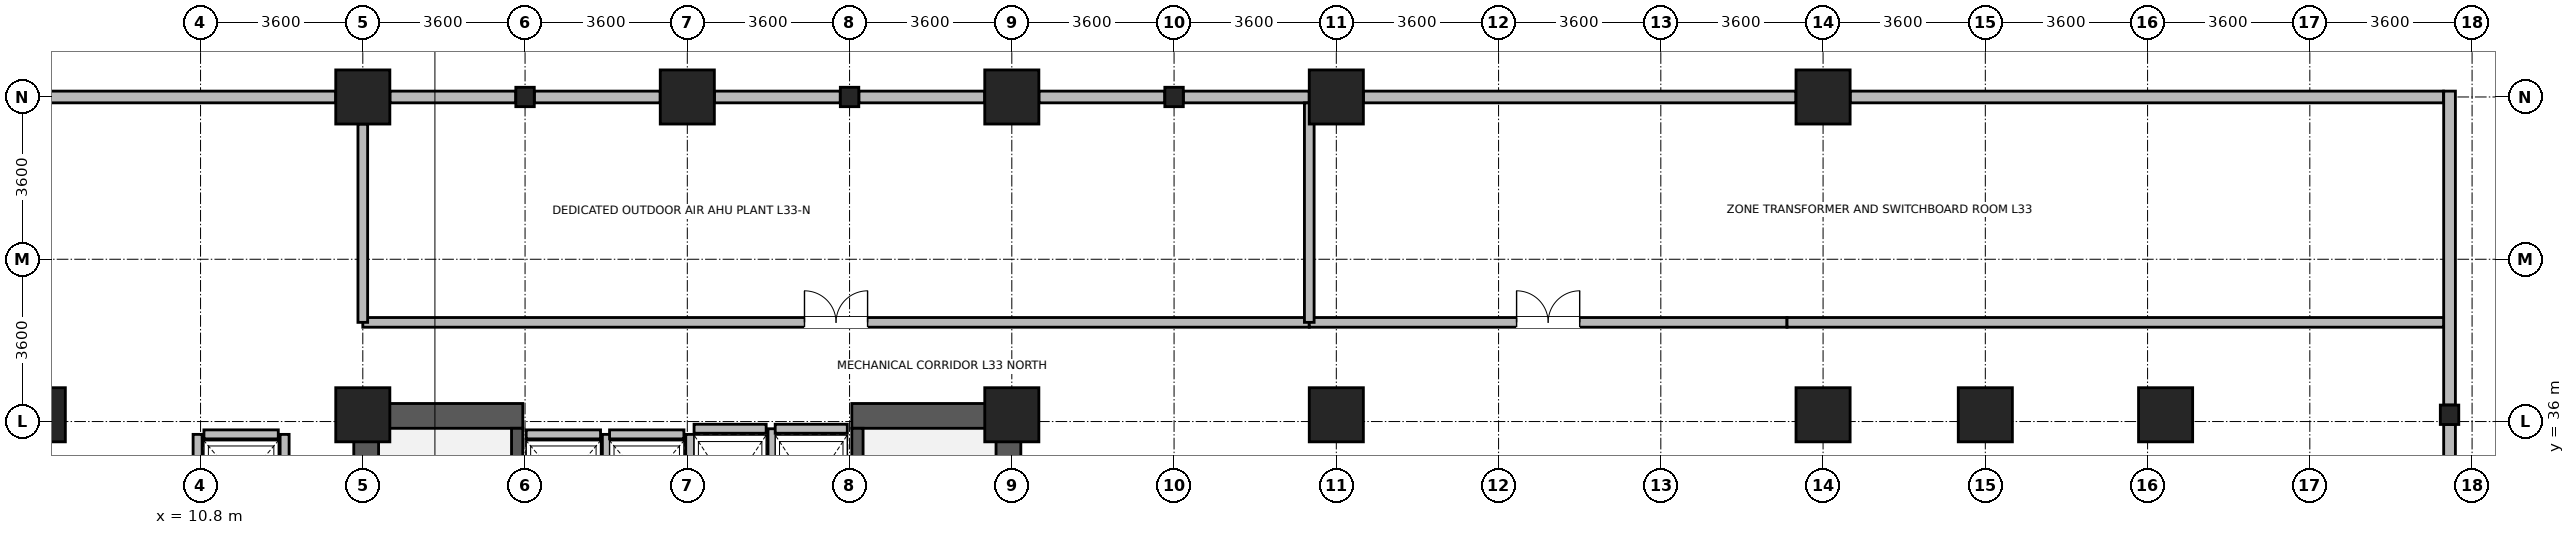
"""IFC4 building model, lengths in metres.
Left out: names, types, materials, properties, quantities, classifications, styles, units other than length and angle.
Written with IfcOpenShell. Run it as: python <this file> out.ifc"""

import sys

from ifc_helpers import new_model, si_unit, direction, frame, frame_2d, origin, origin_2d, place, context, subcontext, project, spatial, rectangle, i_section, extrude, source, transform, mapped, element, fill, save


model = new_model("IFC4")
c1 = context("Model", 3, precision=1e-05, world=origin(), true_north=direction((0.0, 1.0)))
c2 = subcontext(c1, "Body", "Model", "MODEL_VIEW")
j1 = project(units=[si_unit("LENGTHUNIT", "METRE"), si_unit("PLANEANGLEUNIT", "RADIAN")], contexts=[c1])
p1 = place(None, origin())
s1 = spatial("IfcSite", under=j1, at=p1, CompositionType="ELEMENT")
p2 = place(p1, origin())
s2 = spatial("IfcBuilding", under=s1, at=p2, CompositionType="ELEMENT")
p3 = place(p2, frame((0.0, 0.0, 130.4)))
s3 = spatial("IfcBuildingStorey", under=s2, at=p3, CompositionType="ELEMENT", Elevation=130.4)
for number, where, z_axis, x_axis in (
    (1, (14.475, 28.3, 0.0), (0.0, 0.0, 1.0), (0.0, 1.0, 0.0)),
    (2, (28.725, 28.3, 0.0), (0.0, 0.0, 1.0), (0.0, 1.0, 0.0)),
):
    element("IfcWall", number, at=place(p3, frame(where, z_axis=z_axis, x_axis=x_axis)), inside=s3, PredefinedType="SHEAR", context=c2, shape_type="SweptSolid", body=[
        extrude(rectangle(XDim=8.1, YDim=0.55, at=frame_2d((4.05, 0.0))), origin(), (0.0, 0.0, 1.0), 4.78),
    ])
for number, where, z_axis, x_axis in (
    (3, (14.75, 36.125, 0.0), (0.0, 0.0, 1.0), (1.0, 0.0, 0.0)),
    (4, (25.25, 36.125, 0.0), (0.0, 0.0, 1.0), (1.0, 0.0, 0.0)),
):
    element("IfcWall", number, at=place(p3, frame(where, z_axis=z_axis, x_axis=x_axis)), inside=s3, PredefinedType="SHEAR", context=c2, shape_type="SweptSolid", body=[
        extrude(rectangle(XDim=3.2, YDim=0.55, at=frame_2d((1.6, 0.0))), origin(), (0.0, 0.0, 1.0), 4.78),
    ])
p4 = place(p3, frame((17.825, 28.85, 0.0), z_axis=(0.0, 0.0, 1.0), x_axis=(0.0, 1.0, 0.0)))
e5 = element("IfcWall", 5, at=p4, inside=s3, PredefinedType="SHEAR", context=c2, shape_type="SweptSolid", body=[
    extrude(rectangle(XDim=7.0, YDim=0.25, at=frame_2d((3.5, 0.0))), origin(), (0.0, 0.0, 1.0), 4.78),
])
p5 = place(p4, frame((0.15, 0.0, 0.0)))
e6 = element("IfcOpeningElement", 6, at=p5, cuts=e5, PredefinedType="OPENING", context=c2, shape_type="SweptSolid", body=[
    extrude(rectangle(XDim=1.1, YDim=2.08, at=frame_2d((0.55, 1.04))), frame((0.0, 0.135, 0.0), z_axis=(0.0, -1.0, 0.0), x_axis=(1.0, 0.0, 0.0)), (0.0, 0.0, 1.0), 0.27),
])
p6 = place(p3, frame((25.375, 28.85, 0.0), z_axis=(0.0, 0.0, 1.0), x_axis=(0.0, 1.0, 0.0)))
e7 = element("IfcWall", 7, at=p6, inside=s3, PredefinedType="SHEAR", context=c2, shape_type="SweptSolid", body=[
    extrude(rectangle(XDim=7.0, YDim=0.25, at=frame_2d((3.5, 0.0))), origin(), (0.0, 0.0, 1.0), 4.78),
])
p7 = place(p6, frame((0.15, 0.0, 0.0)))
e8 = element("IfcOpeningElement", 8, at=p7, cuts=e7, PredefinedType="OPENING", context=c2, shape_type="SweptSolid", body=[
    extrude(rectangle(XDim=1.1, YDim=2.08, at=frame_2d((0.55, 1.04))), frame((0.0, 0.135, 0.0), z_axis=(0.0, -1.0, 0.0), x_axis=(1.0, 0.0, 0.0)), (0.0, 0.0, 1.0), 0.27),
])
m1 = source(origin(), c2, "Body", "SweptSolid", [
    extrude(rectangle(XDim=1.2, YDim=1.2, at=origin_2d()), origin(), (0.0, 0.0, 1.0), 5.2),
])
for number, where, z_axis, x_axis in (
    (9, (7.2, 36.15, 0.0), (0.0, 0.0, 1.0), (1.0, 0.0, 0.0)),
    (10, (14.4, 36.15, 0.0), (0.0, 0.0, 1.0), (1.0, 0.0, 0.0)),
    (11, (14.4, 43.2, 0.0), (0.0, 0.0, 1.0), (1.0, 0.0, 0.0)),
    (12, (21.6, 43.2, 0.0), (0.0, 0.0, 1.0), (1.0, 0.0, 0.0)),
    (13, (28.8, 36.15, 0.0), (0.0, 0.0, 1.0), (1.0, 0.0, 0.0)),
    (14, (28.8, 43.2, 0.0), (0.0, 0.0, 1.0), (1.0, 0.0, 0.0)),
    (15, (36.0, 43.2, 0.0), (0.0, 0.0, 1.0), (1.0, 0.0, 0.0)),
    (16, (36.0, 36.15, 0.0), (0.0, 0.0, 1.0), (1.0, 0.0, 0.0)),
    (17, (46.8, 36.15, 0.0), (0.0, 0.0, 1.0), (1.0, 0.0, 0.0)),
    (18, (46.8, 43.2, 0.0), (0.0, 0.0, 1.0), (1.0, 0.0, 0.0)),
    (19, (50.4, 36.15, 0.0), (0.0, 0.0, 1.0), (1.0, 0.0, 0.0)),
    (20, (54.4, 36.15, 0.0), (0.0, 0.0, 1.0), (1.0, 0.0, 0.0)),
):
    element("IfcColumn", number, at=place(p3, frame(where, z_axis=z_axis, x_axis=x_axis)), inside=s3, PredefinedType="COLUMN", context=c2, shape_type="MappedRepresentation", body=[
        mapped(m1, transform((0.0, 0.0, 0.0), x_axis=(1.0, 0.0, 0.0), y_axis=(0.0, 1.0, 0.0), z_axis=(0.0, 0.0, 1.0), scale=1.0)),
    ])
m2 = source(origin(), c2, "Body", "SweptSolid", [
    extrude(i_section(OverallWidth=0.409, OverallDepth=0.43, WebThickness=0.024, FlangeThickness=0.033, FilletRadius=0.015, at=origin_2d()), origin(), (0.0, 0.0, 1.0), 5.2),
])
for number, where, z_axis, x_axis in (
    (21, (18.0, 43.2, 0.0), (0.0, 0.0, 1.0), (1.0, 0.0, 0.0)),
    (22, (25.2, 43.2, 0.0), (0.0, 0.0, 1.0), (1.0, 0.0, 0.0)),
    (23, (32.4, 43.2, 0.0), (0.0, 0.0, 1.0), (1.0, 0.0, 0.0)),
    (24, (60.7, 36.15, 0.0), (0.0, 0.0, 1.0), (1.0, 0.0, 0.0)),
):
    element("IfcColumn", number, at=place(p3, frame(where, z_axis=z_axis, x_axis=x_axis)), inside=s3, PredefinedType="COLUMN", context=c2, shape_type="MappedRepresentation", body=[
        mapped(m2, transform((0.0, 0.0, 0.0), x_axis=(1.0, 0.0, 0.0), y_axis=(0.0, 1.0, 0.0), z_axis=(0.0, 0.0, 1.0), scale=1.0)),
    ])
p8 = place(p3, frame((60.7, 35.934, 0.0), z_axis=(0.0, 0.0, 1.0), x_axis=(0.0, -1.0, 0.0)))
e25 = element("IfcWall", 25, at=p8, inside=s3, PredefinedType="STANDARD", context=c2, shape_type="SweptSolid", body=[
    extrude(rectangle(XDim=7.068, YDim=0.26, at=frame_2d((3.534, 0.0))), origin(), (0.0, 0.0, 1.0), 2.96),
])
p9 = place(p3, frame((60.7, 43.33, 0.0), z_axis=(0.0, 0.0, 1.0), x_axis=(0.0, -1.0, 0.0)))
e26 = element("IfcWall", 26, at=p9, inside=s3, PredefinedType="STANDARD", context=c2, shape_type="SweptSolid", body=[
    extrude(rectangle(XDim=6.964, YDim=0.26, at=frame_2d((3.482, 0.0))), origin(), (0.0, 0.0, 1.0), 4.76),
])
p10 = place(p3, frame((47.401, 43.2, 0.0), z_axis=(0.0, 0.0, 1.0), x_axis=(1.0, 0.0, 0.0)))
e27 = element("IfcWall", 27, at=p10, inside=s3, PredefinedType="STANDARD", context=c2, shape_type="SweptSolid", body=[
    extrude(rectangle(XDim=13.164, YDim=0.26, at=frame_2d((6.582, 0.0))), origin(), (0.0, 0.0, 1.0), 4.76),
])
p11 = place(p3, frame((36.601, 43.2, 0.0), z_axis=(0.0, 0.0, 1.0), x_axis=(1.0, 0.0, 0.0)))
e28 = element("IfcWall", 28, at=p11, inside=s3, PredefinedType="STANDARD", context=c2, shape_type="SweptSolid", body=[
    extrude(rectangle(XDim=9.598, YDim=0.26, at=frame_2d((4.799, 0.0))), origin(), (0.0, 0.0, 1.0), 2.96),
])
p12 = place(p3, frame((32.605, 43.2, 0.0), z_axis=(0.0, 0.0, 1.0), x_axis=(1.0, 0.0, 0.0)))
e29 = element("IfcWall", 29, at=p12, inside=s3, PredefinedType="STANDARD", context=c2, shape_type="SweptSolid", body=[
    extrude(rectangle(XDim=2.793, YDim=0.26, at=frame_2d((1.397, 0.0))), origin(), (0.0, 0.0, 1.0), 2.96),
])
p13 = place(p3, frame((29.401, 43.2, 0.0), z_axis=(0.0, 0.0, 1.0), x_axis=(1.0, 0.0, 0.0)))
e30 = element("IfcWall", 30, at=p13, inside=s3, PredefinedType="STANDARD", context=c2, shape_type="SweptSolid", body=[
    extrude(rectangle(XDim=2.794, YDim=0.26, at=frame_2d((1.397, 0.0))), origin(), (0.0, 0.0, 1.0), 2.96),
])
for number, where, z_axis, x_axis in (
    (31, (25.406, 43.2, 0.0), (0.0, 0.0, 1.0), (1.0, 0.0, 0.0)),
    (32, (22.201, 43.2, 0.0), (0.0, 0.0, 1.0), (1.0, 0.0, 0.0)),
    (33, (18.206, 43.2, 0.0), (0.0, 0.0, 1.0), (1.0, 0.0, 0.0)),
    (34, (15.001, 43.2, 0.0), (0.0, 0.0, 1.0), (1.0, 0.0, 0.0)),
):
    element("IfcWall", number, at=place(p3, frame(where, z_axis=z_axis, x_axis=x_axis)), inside=s3, PredefinedType="STANDARD", context=c2, shape_type="SweptSolid", body=[
        extrude(rectangle(XDim=2.793, YDim=0.26, at=frame_2d((1.397, 0.0))), origin(), (0.0, 0.0, 1.0), 2.96),
    ])
p14 = place(p3, frame((6.835, 43.2, 0.0), z_axis=(0.0, 0.0, 1.0), x_axis=(1.0, 0.0, 0.0)))
e35 = element("IfcWall", 35, at=p14, inside=s3, PredefinedType="STANDARD", context=c2, shape_type="SweptSolid", body=[
    extrude(rectangle(XDim=6.964, YDim=0.26, at=frame_2d((3.482, 0.0))), origin(), (0.0, 0.0, 1.0), 4.76),
])
p15 = place(p3, frame((18.025, 35.715, 0.0), z_axis=(0.0, 0.0, 1.0), x_axis=(1.0, 0.0, 0.0)))
e36 = element("IfcWall", 36, at=p15, inside=s3, PredefinedType="PARTITIONING", context=c2, shape_type="SweptSolid", body=[
    extrude(rectangle(XDim=1.65, YDim=0.2, at=frame_2d((0.825, 0.0))), origin(), (0.0, 0.0, 1.0), 4.76),
])
p16 = place(p3, frame((19.815, 33.485, 0.0), z_axis=(0.0, 0.0, 1.0), x_axis=(0.0, 1.0, 0.0)))
e37 = element("IfcWall", 37, at=p16, inside=s3, PredefinedType="PARTITIONING", context=c2, shape_type="SweptSolid", body=[
    extrude(rectangle(XDim=2.23, YDim=0.2, at=frame_2d((1.115, 0.0))), origin(), (0.0, 0.0, 1.0), 4.76),
])
p17 = place(p3, frame((19.875, 35.715, 0.0), z_axis=(0.0, 0.0, 1.0), x_axis=(1.0, 0.0, 0.0)))
e38 = element("IfcWall", 38, at=p17, inside=s3, PredefinedType="PARTITIONING", context=c2, shape_type="SweptSolid", body=[
    extrude(rectangle(XDim=1.65, YDim=0.2, at=frame_2d((0.825, 0.0))), origin(), (0.0, 0.0, 1.0), 4.76),
])
p18 = place(p3, frame((21.665, 33.485, 0.0), z_axis=(0.0, 0.0, 1.0), x_axis=(0.0, 1.0, 0.0)))
e39 = element("IfcWall", 39, at=p18, inside=s3, PredefinedType="PARTITIONING", context=c2, shape_type="SweptSolid", body=[
    extrude(rectangle(XDim=2.23, YDim=0.2, at=frame_2d((1.115, 0.0))), origin(), (0.0, 0.0, 1.0), 4.76),
])
p19 = place(p3, frame((10.875, 35.715, 0.0), z_axis=(0.0, 0.0, 1.0), x_axis=(1.0, 0.0, 0.0)))
e40 = element("IfcWall", 40, at=p19, inside=s3, PredefinedType="PARTITIONING", context=c2, shape_type="SweptSolid", body=[
    extrude(rectangle(XDim=1.65, YDim=0.2, at=frame_2d((0.825, 0.0))), origin(), (0.0, 0.0, 1.0), 4.76),
])
for number, where, z_axis, x_axis in (
    (41, (10.735, 33.485, 0.0), (0.0, 0.0, 1.0), (0.0, 1.0, 0.0)),
    (42, (12.665, 33.485, 0.0), (0.0, 0.0, 1.0), (0.0, 1.0, 0.0)),
):
    element("IfcWall", number, at=place(p3, frame(where, z_axis=z_axis, x_axis=x_axis)), inside=s3, PredefinedType="PARTITIONING", context=c2, shape_type="SweptSolid", body=[
        extrude(rectangle(XDim=2.23, YDim=0.2, at=frame_2d((1.115, 0.0))), origin(), (0.0, 0.0, 1.0), 4.76),
    ])
p20 = place(p3, frame((21.75, 35.84, 0.0), z_axis=(0.0, 0.0, 1.0), x_axis=(1.0, 0.0, 0.0)))
e43 = element("IfcWall", 43, at=p20, inside=s3, PredefinedType="PARTITIONING", context=c2, shape_type="SweptSolid", body=[
    extrude(rectangle(XDim=1.6, YDim=0.2, at=frame_2d((0.8, 0.0))), origin(), (0.0, 0.0, 1.0), 3.76),
])
p21 = place(p3, frame((23.49, 33.16, 0.0), z_axis=(0.0, 0.0, 1.0), x_axis=(0.0, 1.0, 0.0)))
e44 = element("IfcWall", 44, at=p21, inside=s3, PredefinedType="PARTITIONING", context=c2, shape_type="SweptSolid", body=[
    extrude(rectangle(XDim=2.68, YDim=0.2, at=frame_2d((1.34, 0.0))), origin(), (0.0, 0.0, 1.0), 4.76),
])
p22 = place(p3, frame((23.55, 35.84, 0.0), z_axis=(0.0, 0.0, 1.0), x_axis=(1.0, 0.0, 0.0)))
e45 = element("IfcWall", 45, at=p22, inside=s3, PredefinedType="PARTITIONING", context=c2, shape_type="SweptSolid", body=[
    extrude(rectangle(XDim=1.6, YDim=0.2, at=frame_2d((0.8, 0.0))), origin(), (0.0, 0.0, 1.0), 3.76),
])
p23 = place(p3, frame((14.4, 38.2, 0.0), z_axis=(0.0, 0.0, 1.0), x_axis=(1.0, 0.0, 0.0)))
e46 = element("IfcWall", 46, at=p23, inside=s3, PredefinedType="PARTITIONING", context=c2, shape_type="SweptSolid", body=[
    extrude(rectangle(XDim=21.0, YDim=0.215, at=frame_2d((10.5, 0.0))), origin(), (0.0, 0.0, 1.0), 4.76),
])
p24 = place(p23, frame((9.8, 0.0, 0.0)))
e47 = element("IfcOpeningElement", 47, at=p24, cuts=e46, PredefinedType="OPENING", context=c2, shape_type="SweptSolid", body=[
    extrude(rectangle(XDim=1.4, YDim=2.15, at=frame_2d((0.7, 1.075))), frame((0.0, 0.118, 0.0), z_axis=(0.0, -1.0, 0.0), x_axis=(1.0, 0.0, 0.0)), (0.0, 0.0, 1.0), 0.235),
])
p25 = place(p3, frame((35.4, 38.2, 0.0), z_axis=(0.0, 0.0, 1.0), x_axis=(1.0, 0.0, 0.0)))
e48 = element("IfcWall", 48, at=p25, inside=s3, PredefinedType="PARTITIONING", context=c2, shape_type="SweptSolid", body=[
    extrude(rectangle(XDim=10.6, YDim=0.215, at=frame_2d((5.3, 0.0))), origin(), (0.0, 0.0, 1.0), 4.76),
])
p26 = place(p25, frame((4.6, 0.0, 0.0)))
e49 = element("IfcOpeningElement", 49, at=p26, cuts=e48, PredefinedType="OPENING", context=c2, shape_type="SweptSolid", body=[
    extrude(rectangle(XDim=1.4, YDim=2.15, at=frame_2d((0.7, 1.075))), frame((0.0, 0.118, 0.0), z_axis=(0.0, -1.0, 0.0), x_axis=(1.0, 0.0, 0.0)), (0.0, 0.0, 1.0), 0.235),
])
p27 = place(p3, frame((46.0, 38.2, 0.0), z_axis=(0.0, 0.0, 1.0), x_axis=(1.0, 0.0, 0.0)))
e50 = element("IfcWall", 50, at=p27, inside=s3, PredefinedType="PARTITIONING", context=c2, shape_type="SweptSolid", body=[
    extrude(rectangle(XDim=14.568, YDim=0.215, at=frame_2d((7.284, 0.0))), origin(), (0.0, 0.0, 1.0), 4.76),
])
p28 = place(p3, frame((14.4, 38.2, 0.0), z_axis=(0.0, 0.0, 1.0), x_axis=(0.0, 1.0, 0.0)))
e51 = element("IfcWall", 51, at=p28, inside=s3, PredefinedType="PARTITIONING", context=c2, shape_type="SweptSolid", body=[
    extrude(rectangle(XDim=4.4, YDim=0.215, at=frame_2d((2.2, 0.0))), origin(), (0.0, 0.0, 1.0), 4.76),
])
p29 = place(p3, frame((35.4, 38.2, 0.0), z_axis=(0.0, 0.0, 1.0), x_axis=(0.0, 1.0, 0.0)))
e52 = element("IfcWall", 52, at=p29, inside=s3, PredefinedType="PARTITIONING", context=c2, shape_type="SweptSolid", body=[
    extrude(rectangle(XDim=4.868, YDim=0.215, at=frame_2d((2.434, 0.0))), origin(), (0.0, 0.0, 1.0), 4.76),
])
p30 = place(p24, origin())
e53 = element("IfcDoor", 53, at=p30, inside=s3, OperationType="DOUBLE_DOOR_SINGLE_SWING", PredefinedType="DOOR", context=c2, shape_type="SweptSolid", body=[
    extrude(rectangle(XDim=1.4, YDim=2.15, at=frame_2d((0.7, 1.075))), frame((0.0, 0.025, 0.0), z_axis=(0.0, -1.0, 0.0), x_axis=(1.0, 0.0, 0.0)), (0.0, 0.0, 1.0), 0.05),
])
fill(e47, e53)
p31 = place(p26, origin())
e54 = element("IfcDoor", 54, at=p31, inside=s3, OperationType="DOUBLE_DOOR_SINGLE_SWING", PredefinedType="DOOR", context=c2, shape_type="SweptSolid", body=[
    extrude(rectangle(XDim=1.4, YDim=2.15, at=frame_2d((0.7, 1.075))), frame((0.0, 0.025, 0.0), z_axis=(0.0, -1.0, 0.0), x_axis=(1.0, 0.0, 0.0)), (0.0, 0.0, 1.0), 0.05),
])
fill(e49, e54)
save(model, sys.argv[1])
